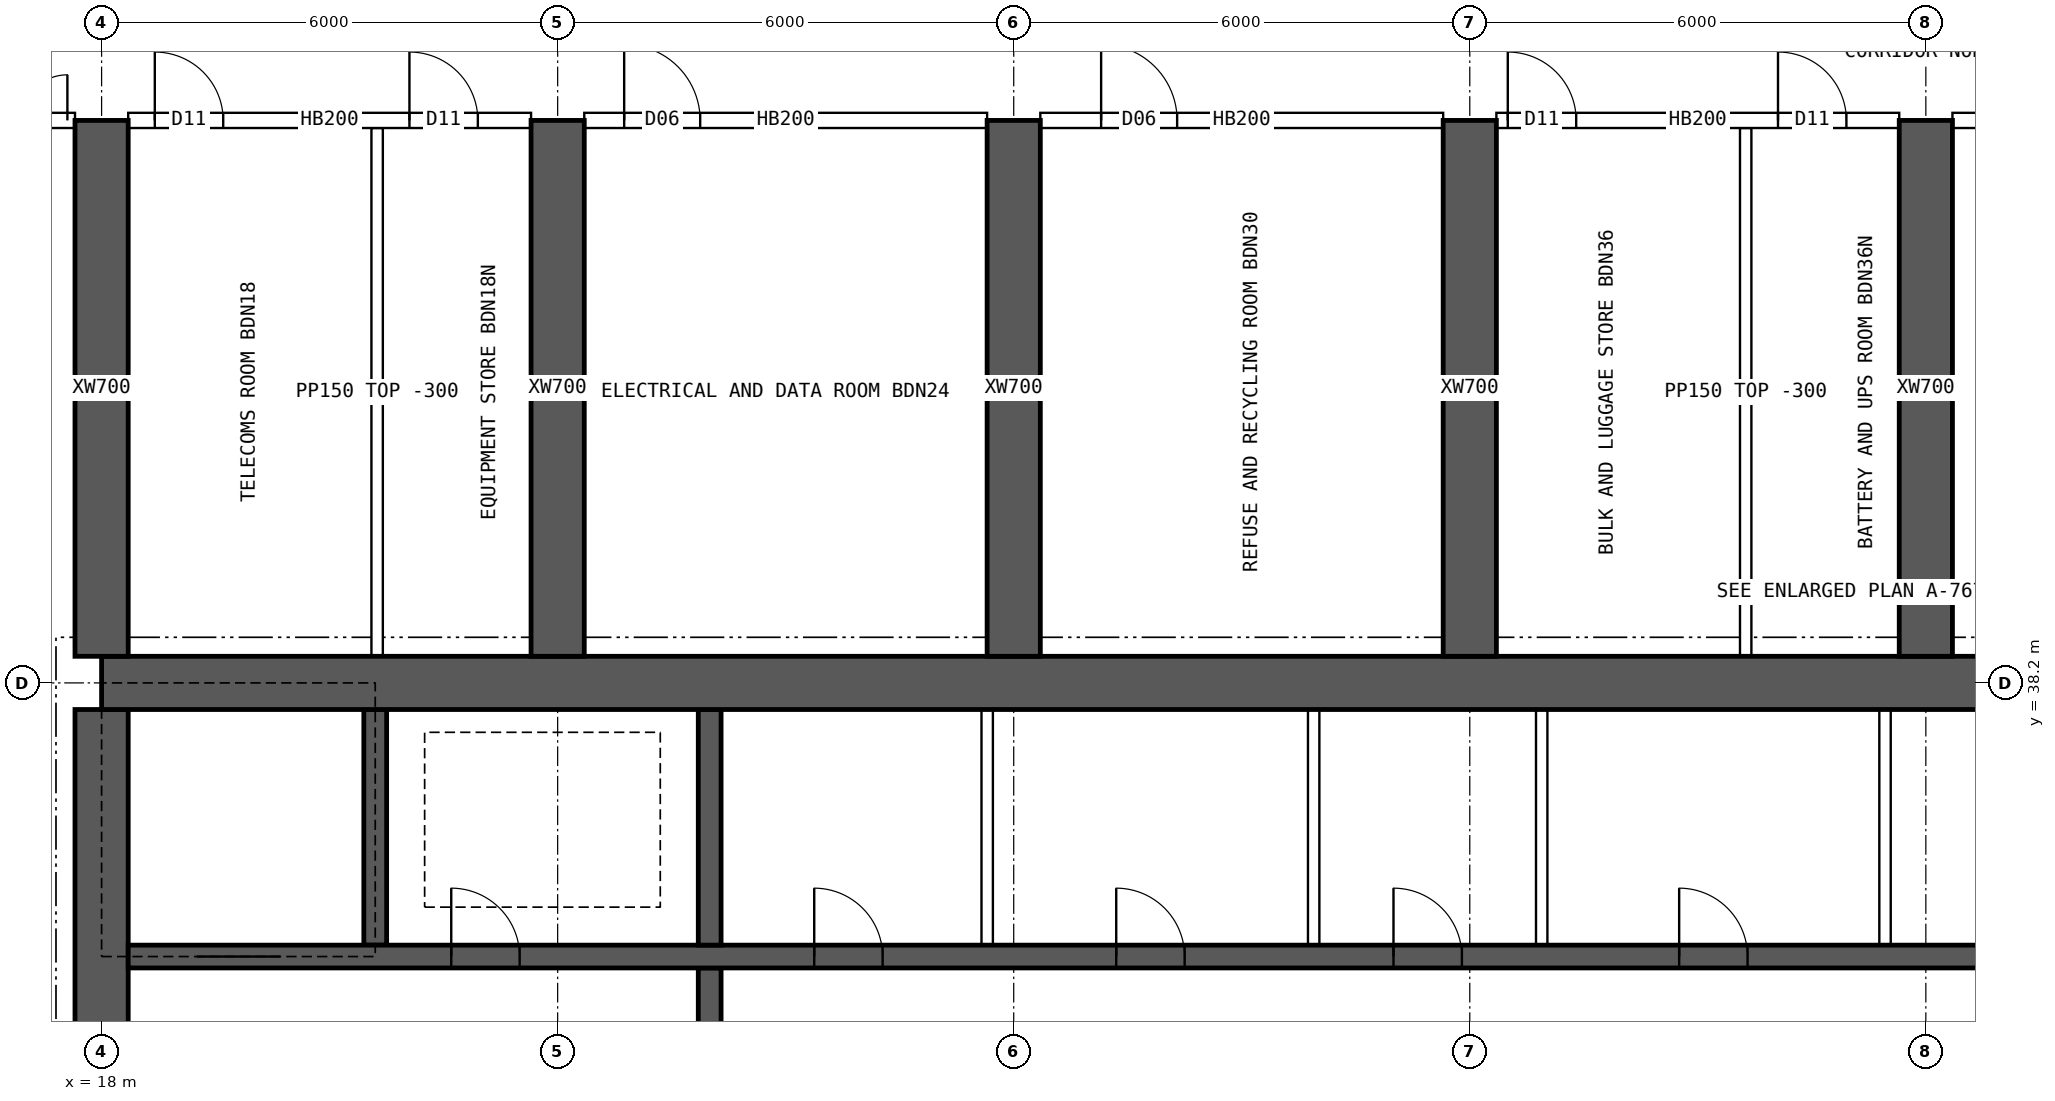
"""IFC4 building model, lengths in metres.
Left out: names, types, materials, properties, quantities, classifications, styles, units other than length and angle.
Written with IfcOpenShell. Run it as: python <this file> out.ifc"""

import sys

from ifc_helpers import new_model, si_unit, direction, frame, frame_2d, origin, place, context, subcontext, project, spatial, rectangle, extrude, element, fill, save


model = new_model("IFC4")
c1 = context("Model", 3, precision=1e-05, world=origin(), true_north=direction((0.0, 1.0)))
c2 = subcontext(c1, "Body", "Model", "MODEL_VIEW")
j1 = project(units=[si_unit("LENGTHUNIT", "METRE"), si_unit("PLANEANGLEUNIT", "RADIAN")], contexts=[c1])
p1 = place(None, origin())
s1 = spatial("IfcSite", under=j1, at=p1, CompositionType="ELEMENT")
p2 = place(p1, origin())
s2 = spatial("IfcBuilding", under=s1, at=p2, CompositionType="ELEMENT")
p3 = place(p2, frame((0.0, 0.0, 257.8)))
s3 = spatial("IfcBuildingStorey", under=s2, at=p3, CompositionType="ELEMENT", Elevation=257.8)
p4 = place(p3, frame((18.0, 38.2, 0.0), z_axis=(0.0, 0.0, 1.0), x_axis=(1.0, 0.0, 0.0)))
e1 = element("IfcWall", 1, at=p4, inside=s3, PredefinedType="SHEAR", context=c2, shape_type="SweptSolid", body=[
    extrude(rectangle(XDim=48.0, YDim=0.7, at=frame_2d((24.0, 0.0))), origin(), (0.0, 0.0, 1.0), 4.5),
])
p5 = place(p3, frame((18.0, 26.15, 0.0), z_axis=(0.0, 0.0, 1.0), x_axis=(0.0, 1.0, 0.0)))
e2 = element("IfcWall", 2, at=p5, inside=s3, PredefinedType="SHEAR", context=c2, shape_type="SweptSolid", body=[
    extrude(rectangle(XDim=11.7, YDim=0.7, at=frame_2d((5.85, 0.0))), origin(), (0.0, 0.0, 1.0), 4.5),
])
p6 = place(p5, frame((5.15, 0.0, 0.0)))
e3 = element("IfcOpeningElement", 3, at=p6, cuts=e2, PredefinedType="OPENING", context=c2, shape_type="SweptSolid", body=[
    extrude(rectangle(XDim=1.2, YDim=2.1, at=frame_2d((0.6, 1.05))), frame((0.0, 0.36, 0.0), z_axis=(0.0, -1.0, 0.0), x_axis=(1.0, 0.0, 0.0)), (0.0, 0.0, 1.0), 0.72),
])
p7 = place(p3, frame((18.35, 34.6, 0.0), z_axis=(0.0, 0.0, 1.0), x_axis=(1.0, 0.0, 0.0)))
e4 = element("IfcWall", 4, at=p7, inside=s3, PredefinedType="SHEAR", context=c2, shape_type="SweptSolid", body=[
    extrude(rectangle(XDim=47.3, YDim=0.3, at=frame_2d((23.65, 0.0))), origin(), (0.0, 0.0, 1.0), 4.5),
])
p8 = place(p7, frame((0.9, 0.0, 0.0)))
e5 = element("IfcOpeningElement", 5, at=p8, cuts=e4, PredefinedType="OPENING", context=c2, shape_type="SweptSolid", body=[
    extrude(rectangle(XDim=1.1, YDim=2.1, at=frame_2d((0.55, 1.05))), frame((0.0, 0.16, 0.0), z_axis=(0.0, -1.0, 0.0), x_axis=(1.0, 0.0, 0.0)), (0.0, 0.0, 1.0), 0.32),
])
p9 = place(p7, frame((45.3, 0.0, 0.0)))
e6 = element("IfcOpeningElement", 6, at=p9, cuts=e4, PredefinedType="OPENING", context=c2, shape_type="SweptSolid", body=[
    extrude(rectangle(XDim=1.1, YDim=2.1, at=frame_2d((0.55, 1.05))), frame((0.0, 0.16, 0.0), z_axis=(0.0, -1.0, 0.0), x_axis=(1.0, 0.0, 0.0)), (0.0, 0.0, 1.0), 0.32),
])
p10 = place(p7, frame((4.25, 0.0, 0.0)))
e7 = element("IfcOpeningElement", 7, at=p10, cuts=e4, PredefinedType="OPENING", context=c2, shape_type="SweptSolid", body=[
    extrude(rectangle(XDim=0.9, YDim=2.1, at=frame_2d((0.45, 1.05))), frame((0.0, 0.16, 0.0), z_axis=(0.0, -1.0, 0.0), x_axis=(1.0, 0.0, 0.0)), (0.0, 0.0, 1.0), 0.32),
])
p11 = place(p7, frame((42.15, 0.0, 0.0)))
e8 = element("IfcOpeningElement", 8, at=p11, cuts=e4, PredefinedType="OPENING", context=c2, shape_type="SweptSolid", body=[
    extrude(rectangle(XDim=0.9, YDim=2.1, at=frame_2d((0.45, 1.05))), frame((0.0, 0.16, 0.0), z_axis=(0.0, -1.0, 0.0), x_axis=(1.0, 0.0, 0.0)), (0.0, 0.0, 1.0), 0.32),
])
p12 = place(p7, frame((9.025, 0.0, 0.0)))
e9 = element("IfcOpeningElement", 9, at=p12, cuts=e4, PredefinedType="OPENING", context=c2, shape_type="SweptSolid", body=[
    extrude(rectangle(XDim=0.9, YDim=2.1, at=frame_2d((0.45, 1.05))), frame((0.0, 0.16, 0.0), z_axis=(0.0, -1.0, 0.0), x_axis=(1.0, 0.0, 0.0)), (0.0, 0.0, 1.0), 0.32),
])
p13 = place(p7, frame((12.999, 0.0, 0.0)))
e10 = element("IfcOpeningElement", 10, at=p13, cuts=e4, PredefinedType="OPENING", context=c2, shape_type="SweptSolid", body=[
    extrude(rectangle(XDim=0.9, YDim=2.1, at=frame_2d((0.45, 1.05))), frame((0.0, 0.16, 0.0), z_axis=(0.0, -1.0, 0.0), x_axis=(1.0, 0.0, 0.0)), (0.0, 0.0, 1.0), 0.32),
])
p14 = place(p7, frame((16.646, 0.0, 0.0)))
e11 = element("IfcOpeningElement", 11, at=p14, cuts=e4, PredefinedType="OPENING", context=c2, shape_type="SweptSolid", body=[
    extrude(rectangle(XDim=0.9, YDim=2.1, at=frame_2d((0.45, 1.05))), frame((0.0, 0.16, 0.0), z_axis=(0.0, -1.0, 0.0), x_axis=(1.0, 0.0, 0.0)), (0.0, 0.0, 1.0), 0.32),
])
p15 = place(p7, frame((20.405, 0.0, 0.0)))
e12 = element("IfcOpeningElement", 12, at=p15, cuts=e4, PredefinedType="OPENING", context=c2, shape_type="SweptSolid", body=[
    extrude(rectangle(XDim=0.9, YDim=2.1, at=frame_2d((0.45, 1.05))), frame((0.0, 0.16, 0.0), z_axis=(0.0, -1.0, 0.0), x_axis=(1.0, 0.0, 0.0)), (0.0, 0.0, 1.0), 0.32),
])
p16 = place(p7, frame((24.811, 0.0, 0.0)))
e13 = element("IfcOpeningElement", 13, at=p16, cuts=e4, PredefinedType="OPENING", context=c2, shape_type="SweptSolid", body=[
    extrude(rectangle(XDim=0.9, YDim=2.1, at=frame_2d((0.45, 1.05))), frame((0.0, 0.16, 0.0), z_axis=(0.0, -1.0, 0.0), x_axis=(1.0, 0.0, 0.0)), (0.0, 0.0, 1.0), 0.32),
])
p17 = place(p7, frame((27.608, 0.0, 0.0)))
e14 = element("IfcOpeningElement", 14, at=p17, cuts=e4, PredefinedType="OPENING", context=c2, shape_type="SweptSolid", body=[
    extrude(rectangle(XDim=0.9, YDim=2.1, at=frame_2d((0.45, 1.05))), frame((0.0, 0.16, 0.0), z_axis=(0.0, -1.0, 0.0), x_axis=(1.0, 0.0, 0.0)), (0.0, 0.0, 1.0), 0.32),
])
p18 = place(p7, frame((29.981, 0.0, 0.0)))
e15 = element("IfcOpeningElement", 15, at=p18, cuts=e4, PredefinedType="OPENING", context=c2, shape_type="SweptSolid", body=[
    extrude(rectangle(XDim=0.9, YDim=2.1, at=frame_2d((0.45, 1.05))), frame((0.0, 0.16, 0.0), z_axis=(0.0, -1.0, 0.0), x_axis=(1.0, 0.0, 0.0)), (0.0, 0.0, 1.0), 0.32),
])
p19 = place(p7, frame((33.831, 0.0, 0.0)))
e16 = element("IfcOpeningElement", 16, at=p19, cuts=e4, PredefinedType="OPENING", context=c2, shape_type="SweptSolid", body=[
    extrude(rectangle(XDim=0.9, YDim=2.1, at=frame_2d((0.45, 1.05))), frame((0.0, 0.16, 0.0), z_axis=(0.0, -1.0, 0.0), x_axis=(1.0, 0.0, 0.0)), (0.0, 0.0, 1.0), 0.32),
])
p20 = place(p7, frame((37.579, 0.0, 0.0)))
e17 = element("IfcOpeningElement", 17, at=p20, cuts=e4, PredefinedType="OPENING", context=c2, shape_type="SweptSolid", body=[
    extrude(rectangle(XDim=0.9, YDim=2.1, at=frame_2d((0.45, 1.05))), frame((0.0, 0.16, 0.0), z_axis=(0.0, -1.0, 0.0), x_axis=(1.0, 0.0, 0.0)), (0.0, 0.0, 1.0), 0.32),
])
p21 = place(p3, frame((26.0, 30.55, 0.0), z_axis=(0.0, 0.0, 1.0), x_axis=(0.0, 1.0, 0.0)))
e18 = element("IfcWall", 18, at=p21, inside=s3, PredefinedType="SHEAR", context=c2, shape_type="SweptSolid", body=[
    extrude(rectangle(XDim=3.9, YDim=0.3, at=frame_2d((1.95, 0.0))), origin(), (0.0, 0.0, 1.0), 4.5),
])
p22 = place(p21, frame((1.4, 0.0, 0.0)))
e19 = element("IfcOpeningElement", 19, at=p22, cuts=e18, PredefinedType="OPENING", context=c2, shape_type="SweptSolid", body=[
    extrude(rectangle(XDim=1.2, YDim=2.1, at=frame_2d((0.6, 1.05))), frame((0.0, 0.16, 0.0), z_axis=(0.0, -1.0, 0.0), x_axis=(1.0, 0.0, 0.0)), (0.0, 0.0, 1.0), 0.32),
])
for number, where, z_axis, x_axis in (
    (20, (21.6, 34.75, 0.0), (0.0, 0.0, 1.0), (0.0, 1.0, 0.0)),
    (21, (26.0, 34.75, 0.0), (0.0, 0.0, 1.0), (0.0, 1.0, 0.0)),
):
    element("IfcWall", number, at=place(p3, frame(where, z_axis=z_axis, x_axis=x_axis)), inside=s3, PredefinedType="SHEAR", context=c2, shape_type="SweptSolid", body=[
        extrude(rectangle(XDim=3.1, YDim=0.3, at=frame_2d((1.55, 0.0))), origin(), (0.0, 0.0, 1.0), 4.5),
    ])
for number, where, z_axis, x_axis in (
    (22, (18.0, 38.55, 0.0), (0.0, 0.0, 1.0), (0.0, 1.0, 0.0)),
    (23, (24.0, 38.55, 0.0), (0.0, 0.0, 1.0), (0.0, 1.0, 0.0)),
    (24, (30.0, 38.55, 0.0), (0.0, 0.0, 1.0), (0.0, 1.0, 0.0)),
    (25, (36.0, 38.55, 0.0), (0.0, 0.0, 1.0), (0.0, 1.0, 0.0)),
    (26, (42.0, 38.55, 0.0), (0.0, 0.0, 1.0), (0.0, 1.0, 0.0)),
):
    element("IfcWall", number, at=place(p3, frame(where, z_axis=z_axis, x_axis=x_axis)), inside=s3, PredefinedType="SHEAR", context=c2, shape_type="SweptSolid", body=[
        extrude(rectangle(XDim=7.05, YDim=0.7, at=frame_2d((3.525, 0.0))), origin(), (0.0, 0.0, 1.0), 4.5),
    ])
for number, where, z_axis, x_axis in (
    (27, (29.651, 34.75, 0.0), (0.0, 0.0, 1.0), (0.0, 1.0, 0.0)),
    (28, (33.946, 34.75, 0.0), (0.0, 0.0, 1.0), (0.0, 1.0, 0.0)),
    (29, (36.946, 34.75, 0.0), (0.0, 0.0, 1.0), (0.0, 1.0, 0.0)),
    (30, (41.463, 34.75, 0.0), (0.0, 0.0, 1.0), (0.0, 1.0, 0.0)),
):
    element("IfcWall", number, at=place(p3, frame(where, z_axis=z_axis, x_axis=x_axis)), inside=s3, PredefinedType="SOLIDWALL", context=c2, shape_type="SweptSolid", body=[
        extrude(rectangle(XDim=3.1, YDim=0.15, at=frame_2d((1.55, 0.0))), origin(), (0.0, 0.0, 1.0), 4.2),
    ])
p23 = place(p3, frame((15.6, 45.6, 0.0), z_axis=(0.0, 0.0, 1.0), x_axis=(1.0, 0.0, 0.0)))
e31 = element("IfcWall", 31, at=p23, inside=s3, PredefinedType="SOLIDWALL", context=c2, shape_type="SweptSolid", body=[
    extrude(rectangle(XDim=2.05, YDim=0.2, at=frame_2d((1.025, 0.0))), origin(), (0.0, 0.0, 1.0), 4.2),
])
p24 = place(p23, frame((0.75, 0.0, 0.0)))
e32 = element("IfcOpeningElement", 32, at=p24, cuts=e31, PredefinedType="OPENING", context=c2, shape_type="SweptSolid", body=[
    extrude(rectangle(XDim=1.2, YDim=2.1, at=frame_2d((0.6, 1.05))), frame((0.0, 0.11, 0.0), z_axis=(0.0, -1.0, 0.0), x_axis=(1.0, 0.0, 0.0)), (0.0, 0.0, 1.0), 0.22),
])
p25 = place(p3, frame((18.35, 45.6, 0.0), z_axis=(0.0, 0.0, 1.0), x_axis=(1.0, 0.0, 0.0)))
e33 = element("IfcWall", 33, at=p25, inside=s3, PredefinedType="SOLIDWALL", context=c2, shape_type="SweptSolid", body=[
    extrude(rectangle(XDim=5.3, YDim=0.2, at=frame_2d((2.65, 0.0))), origin(), (0.0, 0.0, 1.0), 4.2),
])
p26 = place(p25, frame((0.35, 0.0, 0.0)))
e34 = element("IfcOpeningElement", 34, at=p26, cuts=e33, PredefinedType="OPENING", context=c2, shape_type="SweptSolid", body=[
    extrude(rectangle(XDim=0.9, YDim=2.1, at=frame_2d((0.45, 1.05))), frame((0.0, 0.11, 0.0), z_axis=(0.0, -1.0, 0.0), x_axis=(1.0, 0.0, 0.0)), (0.0, 0.0, 1.0), 0.22),
])
p27 = place(p25, frame((3.7, 0.0, 0.0)))
e35 = element("IfcOpeningElement", 35, at=p27, cuts=e33, PredefinedType="OPENING", context=c2, shape_type="SweptSolid", body=[
    extrude(rectangle(XDim=0.9, YDim=2.1, at=frame_2d((0.45, 1.05))), frame((0.0, 0.11, 0.0), z_axis=(0.0, -1.0, 0.0), x_axis=(1.0, 0.0, 0.0)), (0.0, 0.0, 1.0), 0.22),
])
p28 = place(p3, frame((24.35, 45.6, 0.0), z_axis=(0.0, 0.0, 1.0), x_axis=(1.0, 0.0, 0.0)))
e36 = element("IfcWall", 36, at=p28, inside=s3, PredefinedType="SOLIDWALL", context=c2, shape_type="SweptSolid", body=[
    extrude(rectangle(XDim=5.3, YDim=0.2, at=frame_2d((2.65, 0.0))), origin(), (0.0, 0.0, 1.0), 4.2),
])
p29 = place(p28, frame((0.525, 0.0, 0.0)))
e37 = element("IfcOpeningElement", 37, at=p29, cuts=e36, PredefinedType="OPENING", context=c2, shape_type="SweptSolid", body=[
    extrude(rectangle(XDim=1.0, YDim=2.1, at=frame_2d((0.5, 1.05))), frame((0.0, 0.11, 0.0), z_axis=(0.0, -1.0, 0.0), x_axis=(1.0, 0.0, 0.0)), (0.0, 0.0, 1.0), 0.22),
])
p30 = place(p3, frame((30.35, 45.6, 0.0), z_axis=(0.0, 0.0, 1.0), x_axis=(1.0, 0.0, 0.0)))
e38 = element("IfcWall", 38, at=p30, inside=s3, PredefinedType="SOLIDWALL", context=c2, shape_type="SweptSolid", body=[
    extrude(rectangle(XDim=5.3, YDim=0.2, at=frame_2d((2.65, 0.0))), origin(), (0.0, 0.0, 1.0), 4.2),
])
p31 = place(p30, frame((0.8, 0.0, 0.0)))
e39 = element("IfcOpeningElement", 39, at=p31, cuts=e38, PredefinedType="OPENING", context=c2, shape_type="SweptSolid", body=[
    extrude(rectangle(XDim=1.0, YDim=2.1, at=frame_2d((0.5, 1.05))), frame((0.0, 0.11, 0.0), z_axis=(0.0, -1.0, 0.0), x_axis=(1.0, 0.0, 0.0)), (0.0, 0.0, 1.0), 0.22),
])
p32 = place(p3, frame((36.35, 45.6, 0.0), z_axis=(0.0, 0.0, 1.0), x_axis=(1.0, 0.0, 0.0)))
e40 = element("IfcWall", 40, at=p32, inside=s3, PredefinedType="SOLIDWALL", context=c2, shape_type="SweptSolid", body=[
    extrude(rectangle(XDim=5.3, YDim=0.2, at=frame_2d((2.65, 0.0))), origin(), (0.0, 0.0, 1.0), 4.2),
])
p33 = place(p32, frame((0.15, 0.0, 0.0)))
e41 = element("IfcOpeningElement", 41, at=p33, cuts=e40, PredefinedType="OPENING", context=c2, shape_type="SweptSolid", body=[
    extrude(rectangle(XDim=0.9, YDim=2.1, at=frame_2d((0.45, 1.05))), frame((0.0, 0.11, 0.0), z_axis=(0.0, -1.0, 0.0), x_axis=(1.0, 0.0, 0.0)), (0.0, 0.0, 1.0), 0.22),
])
p34 = place(p32, frame((3.705, 0.0, 0.0)))
e42 = element("IfcOpeningElement", 42, at=p34, cuts=e40, PredefinedType="OPENING", context=c2, shape_type="SweptSolid", body=[
    extrude(rectangle(XDim=0.9, YDim=2.1, at=frame_2d((0.45, 1.05))), frame((0.0, 0.11, 0.0), z_axis=(0.0, -1.0, 0.0), x_axis=(1.0, 0.0, 0.0)), (0.0, 0.0, 1.0), 0.22),
])
p35 = place(p3, frame((42.35, 45.6, 0.0), z_axis=(0.0, 0.0, 1.0), x_axis=(1.0, 0.0, 0.0)))
e43 = element("IfcWall", 43, at=p35, inside=s3, PredefinedType="SOLIDWALL", context=c2, shape_type="SweptSolid", body=[
    extrude(rectangle(XDim=5.3, YDim=0.2, at=frame_2d((2.65, 0.0))), origin(), (0.0, 0.0, 1.0), 4.2),
])
p36 = place(p35, frame((0.8, 0.0, 0.0)))
e44 = element("IfcOpeningElement", 44, at=p36, cuts=e43, PredefinedType="OPENING", context=c2, shape_type="SweptSolid", body=[
    extrude(rectangle(XDim=1.0, YDim=2.1, at=frame_2d((0.5, 1.05))), frame((0.0, 0.11, 0.0), z_axis=(0.0, -1.0, 0.0), x_axis=(1.0, 0.0, 0.0)), (0.0, 0.0, 1.0), 0.22),
])
for number, where, z_axis, x_axis in (
    (45, (21.625, 38.55, 0.0), (0.0, 0.0, 1.0), (0.0, 1.0, 0.0)),
    (46, (39.63, 38.55, 0.0), (0.0, 0.0, 1.0), (0.0, 1.0, 0.0)),
):
    element("IfcWall", number, at=place(p3, frame(where, z_axis=z_axis, x_axis=x_axis)), inside=s3, PredefinedType="PARTITIONING", context=c2, shape_type="SweptSolid", body=[
        extrude(rectangle(XDim=6.95, YDim=0.15, at=frame_2d((3.475, 0.0))), origin(), (0.0, 0.0, 1.0), 4.2),
    ])
p37 = place(p8, origin())
e47 = element("IfcDoor", 47, at=p37, inside=s3, OperationType="DOUBLE_DOOR_SLIDING", PredefinedType="DOOR", context=c2, shape_type="SweptSolid", body=[
    extrude(rectangle(XDim=1.1, YDim=2.1, at=frame_2d((0.55, 1.05))), frame((0.0, 0.025, 0.0), z_axis=(0.0, -1.0, 0.0), x_axis=(1.0, 0.0, 0.0)), (0.0, 0.0, 1.0), 0.05),
])
fill(e5, e47)
p38 = place(p10, origin())
e48 = element("IfcDoor", 48, at=p38, inside=s3, OperationType="SINGLE_SWING_LEFT", PredefinedType="DOOR", context=c2, shape_type="SweptSolid", body=[
    extrude(rectangle(XDim=0.9, YDim=2.1, at=frame_2d((0.45, 1.05))), frame((0.0, 0.025, 0.0), z_axis=(0.0, -1.0, 0.0), x_axis=(1.0, 0.0, 0.0)), (0.0, 0.0, 1.0), 0.05),
])
fill(e7, e48)
p39 = place(p12, origin())
e49 = element("IfcDoor", 49, at=p39, inside=s3, OperationType="SINGLE_SWING_LEFT", PredefinedType="DOOR", context=c2, shape_type="SweptSolid", body=[
    extrude(rectangle(XDim=0.9, YDim=2.1, at=frame_2d((0.45, 1.05))), frame((0.0, 0.025, 0.0), z_axis=(0.0, -1.0, 0.0), x_axis=(1.0, 0.0, 0.0)), (0.0, 0.0, 1.0), 0.05),
])
fill(e9, e49)
p40 = place(p13, origin())
e50 = element("IfcDoor", 50, at=p40, inside=s3, OperationType="SINGLE_SWING_LEFT", PredefinedType="DOOR", context=c2, shape_type="SweptSolid", body=[
    extrude(rectangle(XDim=0.9, YDim=2.1, at=frame_2d((0.45, 1.05))), frame((0.0, 0.025, 0.0), z_axis=(0.0, -1.0, 0.0), x_axis=(1.0, 0.0, 0.0)), (0.0, 0.0, 1.0), 0.05),
])
fill(e10, e50)
p41 = place(p14, origin())
e51 = element("IfcDoor", 51, at=p41, inside=s3, OperationType="SINGLE_SWING_LEFT", PredefinedType="DOOR", context=c2, shape_type="SweptSolid", body=[
    extrude(rectangle(XDim=0.9, YDim=2.1, at=frame_2d((0.45, 1.05))), frame((0.0, 0.025, 0.0), z_axis=(0.0, -1.0, 0.0), x_axis=(1.0, 0.0, 0.0)), (0.0, 0.0, 1.0), 0.05),
])
fill(e11, e51)
p42 = place(p15, origin())
e52 = element("IfcDoor", 52, at=p42, inside=s3, OperationType="SINGLE_SWING_LEFT", PredefinedType="DOOR", context=c2, shape_type="SweptSolid", body=[
    extrude(rectangle(XDim=0.9, YDim=2.1, at=frame_2d((0.45, 1.05))), frame((0.0, 0.025, 0.0), z_axis=(0.0, -1.0, 0.0), x_axis=(1.0, 0.0, 0.0)), (0.0, 0.0, 1.0), 0.05),
])
fill(e12, e52)
p43 = place(p24, origin())
e53 = element("IfcDoor", 53, at=p43, inside=s3, OperationType="DOUBLE_DOOR_SINGLE_SWING", PredefinedType="DOOR", context=c2, shape_type="SweptSolid", body=[
    extrude(rectangle(XDim=1.2, YDim=2.1, at=frame_2d((0.6, 1.05))), frame((0.0, 0.025, 0.0), z_axis=(0.0, -1.0, 0.0), x_axis=(1.0, 0.0, 0.0)), (0.0, 0.0, 1.0), 0.05),
])
fill(e32, e53)
p44 = place(p26, origin())
e54 = element("IfcDoor", 54, at=p44, inside=s3, OperationType="SINGLE_SWING_LEFT", PredefinedType="DOOR", context=c2, shape_type="SweptSolid", body=[
    extrude(rectangle(XDim=0.9, YDim=2.1, at=frame_2d((0.45, 1.05))), frame((0.0, 0.025, 0.0), z_axis=(0.0, -1.0, 0.0), x_axis=(1.0, 0.0, 0.0)), (0.0, 0.0, 1.0), 0.05),
])
fill(e34, e54)
p45 = place(p27, origin())
e55 = element("IfcDoor", 55, at=p45, inside=s3, OperationType="SINGLE_SWING_LEFT", PredefinedType="DOOR", context=c2, shape_type="SweptSolid", body=[
    extrude(rectangle(XDim=0.9, YDim=2.1, at=frame_2d((0.45, 1.05))), frame((0.0, 0.025, 0.0), z_axis=(0.0, -1.0, 0.0), x_axis=(1.0, 0.0, 0.0)), (0.0, 0.0, 1.0), 0.05),
])
fill(e35, e55)
p46 = place(p29, origin())
e56 = element("IfcDoor", 56, at=p46, inside=s3, OperationType="SINGLE_SWING_LEFT", PredefinedType="DOOR", context=c2, shape_type="SweptSolid", body=[
    extrude(rectangle(XDim=1.0, YDim=2.1, at=frame_2d((0.5, 1.05))), frame((0.0, 0.025, 0.0), z_axis=(0.0, -1.0, 0.0), x_axis=(1.0, 0.0, 0.0)), (0.0, 0.0, 1.0), 0.05),
])
fill(e37, e56)
p47 = place(p31, origin())
e57 = element("IfcDoor", 57, at=p47, inside=s3, OperationType="SINGLE_SWING_LEFT", PredefinedType="DOOR", context=c2, shape_type="SweptSolid", body=[
    extrude(rectangle(XDim=1.0, YDim=2.1, at=frame_2d((0.5, 1.05))), frame((0.0, 0.025, 0.0), z_axis=(0.0, -1.0, 0.0), x_axis=(1.0, 0.0, 0.0)), (0.0, 0.0, 1.0), 0.05),
])
fill(e39, e57)
p48 = place(p33, origin())
e58 = element("IfcDoor", 58, at=p48, inside=s3, OperationType="SINGLE_SWING_LEFT", PredefinedType="DOOR", context=c2, shape_type="SweptSolid", body=[
    extrude(rectangle(XDim=0.9, YDim=2.1, at=frame_2d((0.45, 1.05))), frame((0.0, 0.025, 0.0), z_axis=(0.0, -1.0, 0.0), x_axis=(1.0, 0.0, 0.0)), (0.0, 0.0, 1.0), 0.05),
])
fill(e41, e58)
p49 = place(p34, origin())
e59 = element("IfcDoor", 59, at=p49, inside=s3, OperationType="SINGLE_SWING_LEFT", PredefinedType="DOOR", context=c2, shape_type="SweptSolid", body=[
    extrude(rectangle(XDim=0.9, YDim=2.1, at=frame_2d((0.45, 1.05))), frame((0.0, 0.025, 0.0), z_axis=(0.0, -1.0, 0.0), x_axis=(1.0, 0.0, 0.0)), (0.0, 0.0, 1.0), 0.05),
])
fill(e42, e59)
save(model, sys.argv[1])
